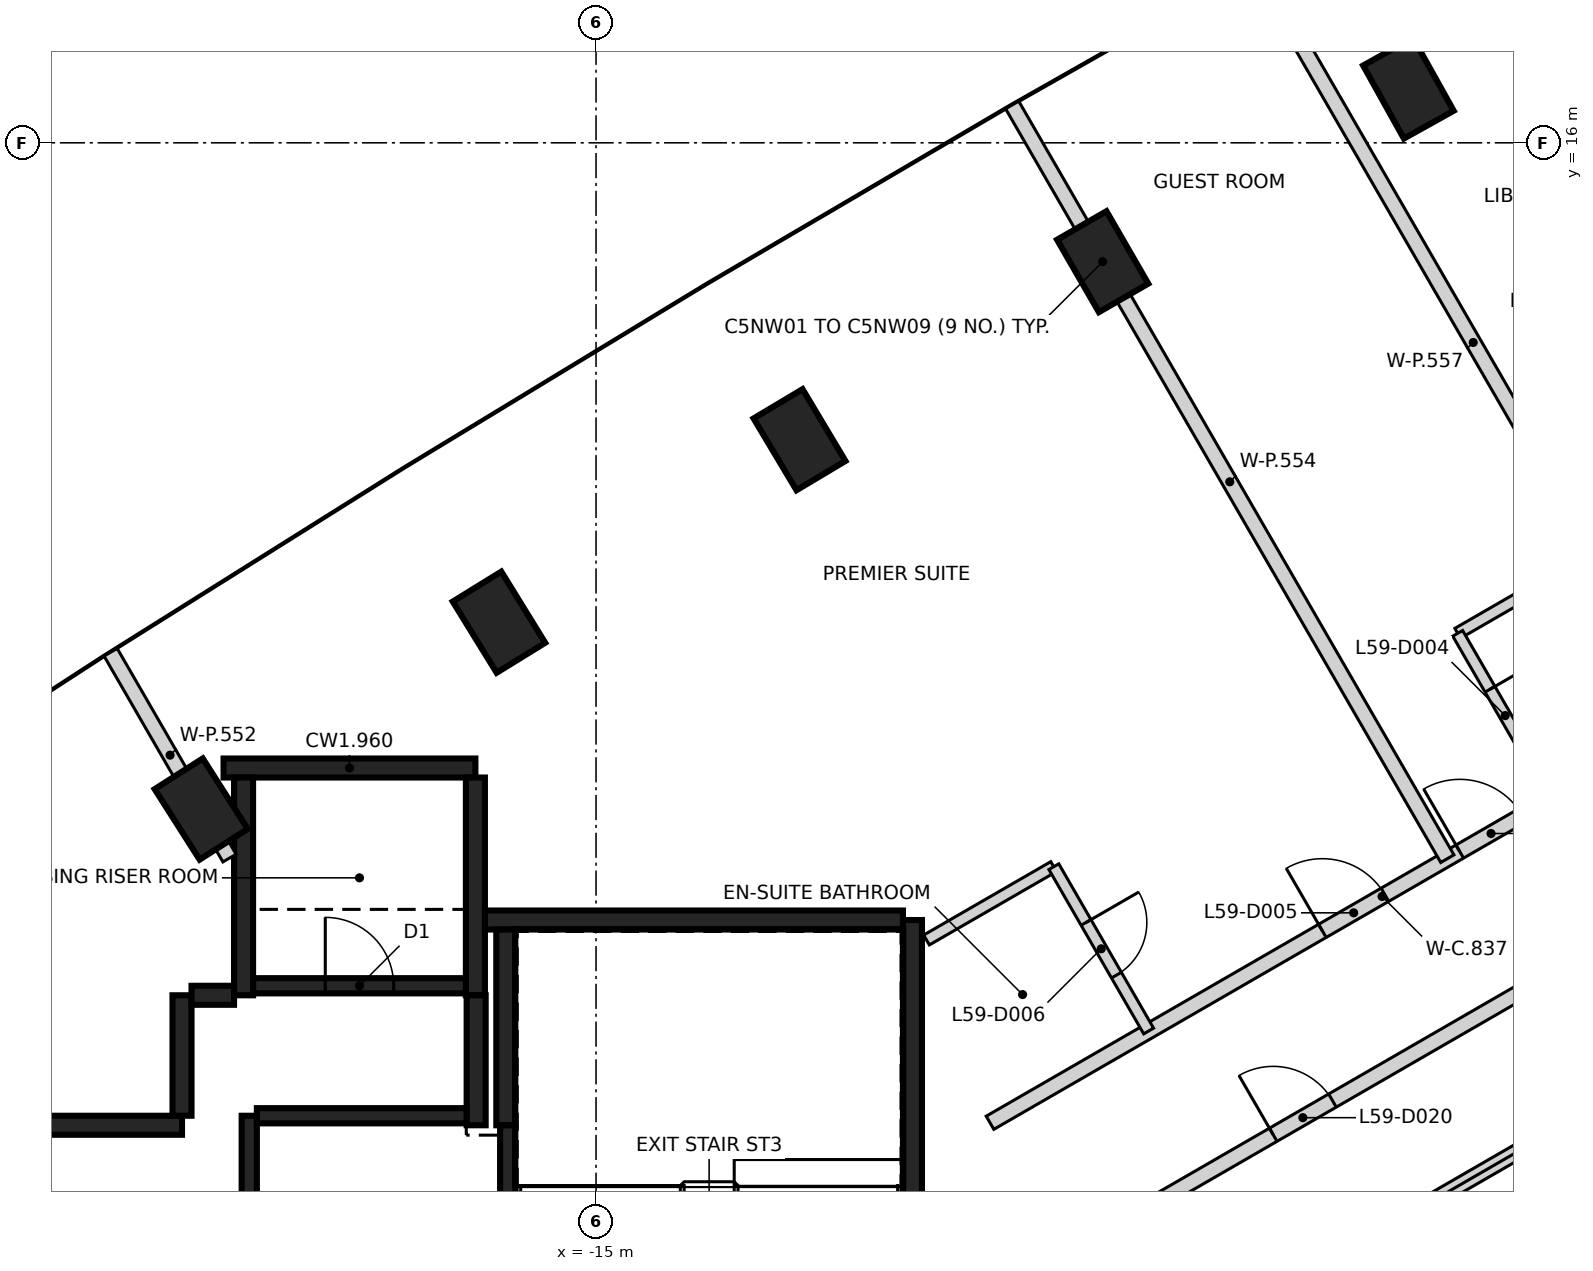
"""IFC4 building model, lengths in metres.
Left out: names, types, materials, properties, quantities, classifications, styles, units other than length and angle.
Written with IfcOpenShell. Run it as: python <this file> out.ifc"""

import sys

from ifc_helpers import new_model, si_unit, direction, frame, frame_2d, origin, origin_2d, place, context, subcontext, project, spatial, rectangle, extrude, element, fill, save


model = new_model("IFC4")
c1 = context("Model", 3, precision=1e-05, world=origin(), true_north=direction((0.0, 1.0)))
c2 = subcontext(c1, "Body", "Model", "MODEL_VIEW")
j1 = project(units=[si_unit("LENGTHUNIT", "METRE"), si_unit("PLANEANGLEUNIT", "RADIAN")], contexts=[c1])
p1 = place(None, origin())
s1 = spatial("IfcSite", under=j1, at=p1, CompositionType="ELEMENT")
p2 = place(p1, origin())
s2 = spatial("IfcBuilding", under=s1, at=p2, CompositionType="ELEMENT")
p3 = place(p2, frame((0.0, 0.0, 235.8)))
s3 = spatial("IfcBuildingStorey", under=s2, at=p3, CompositionType="ELEMENT", Elevation=235.8)
for number, where, z_axis, x_axis in (
    (1, (-4.312, 16.719, -0.35), (0.0, 0.0, 1.0), (-0.487, 0.873, 0.0)),
    (2, (-8.335, 14.436, -0.35), (0.0, 0.0, 1.0), (-0.5, 0.866, 0.0)),
    (3, (-12.323, 12.094, -0.35), (0.0, 0.0, 1.0), (-0.513, 0.858, 0.0)),
    (4, (-16.277, 9.693, -0.35), (0.0, 0.0, 1.0), (-0.525, 0.851, 0.0)),
    (5, (-20.195, 7.235, -0.35), (0.0, 0.0, 1.0), (-0.538, 0.843, 0.0)),
):
    element("IfcColumn", number, at=place(p3, frame(where, z_axis=z_axis, x_axis=x_axis)), inside=s3, PredefinedType="COLUMN", context=c2, shape_type="SweptSolid", body=[
        extrude(rectangle(XDim=1.1, YDim=0.75, at=origin_2d()), origin(), (0.0, 0.0, 1.0), 3.6),
    ])
p4 = place(p3, frame((-10.837, 5.775, 0.0), z_axis=(0.0, 0.0, 1.0), x_axis=(0.0, -1.0, 0.0)))
e6 = element("IfcWall", 6, at=p4, inside=s3, PredefinedType="SHEAR", context=c2, shape_type="SweptSolid", body=[
    extrude(rectangle(XDim=11.55, YDim=0.25, at=frame_2d((5.775, 0.0))), origin(), (0.0, 0.0, 1.0), 3.25),
])
p5 = place(p4, frame((10.025, 0.0, 0.0)))
e7 = element("IfcOpeningElement", 7, at=p5, cuts=e6, PredefinedType="OPENING", context=c2, shape_type="SweptSolid", body=[
    extrude(rectangle(XDim=1.2, YDim=2.1, at=frame_2d((0.6, 1.05))), frame((0.0, 0.135, 0.0), z_axis=(0.0, -1.0, 0.0), x_axis=(1.0, 0.0, 0.0)), (0.0, 0.0, 1.0), 0.27),
])
p6 = place(p4, frame((8.725, 0.0, 0.0)))
e8 = element("IfcOpeningElement", 8, at=p6, cuts=e6, PredefinedType="OPENING", context=c2, shape_type="SweptSolid", body=[
    extrude(rectangle(XDim=1.2, YDim=2.1, at=frame_2d((0.6, 1.05))), frame((0.0, 0.135, 0.0), z_axis=(0.0, -1.0, 0.0), x_axis=(1.0, 0.0, 0.0)), (0.0, 0.0, 1.0), 0.27),
])
p7 = place(p3, frame((-16.472, 5.775, 0.0), z_axis=(0.0, 0.0, 1.0), x_axis=(1.0, 0.0, 0.0)))
e9 = element("IfcWall", 9, at=p7, inside=s3, PredefinedType="SHEAR", context=c2, shape_type="SweptSolid", body=[
    extrude(rectangle(XDim=5.51, YDim=0.25, at=frame_2d((2.755, 0.0))), origin(), (0.0, 0.0, 1.0), 3.25),
])
p8 = place(p3, frame((-19.9, 7.775, 0.0), z_axis=(0.0, 0.0, 1.0), x_axis=(1.0, 0.0, 0.0)))
e10 = element("IfcWall", 10, at=p8, inside=s3, PredefinedType="SHEAR", context=c2, shape_type="SweptSolid", body=[
    extrude(rectangle(XDim=3.313, YDim=0.25, at=frame_2d((1.656, 0.0))), origin(), (0.0, 0.0, 1.0), 3.25),
])
for number, where, z_axis, x_axis in (
    (11, (-16.587, 7.65, 0.0), (0.0, 0.0, 1.0), (0.0, -1.0, 0.0)),
    (12, (-19.637, 4.785, 0.0), (0.0, 0.0, 1.0), (0.0, 1.0, 0.0)),
):
    element("IfcWall", number, at=place(p3, frame(where, z_axis=z_axis, x_axis=x_axis)), inside=s3, PredefinedType="SHEAR", context=c2, shape_type="SweptSolid", body=[
        extrude(rectangle(XDim=2.865, YDim=0.25, at=frame_2d((1.432, 0.0))), origin(), (0.0, 0.0, 1.0), 3.25),
    ])
p9 = place(p3, frame((-16.187, 3.075, 0.0), z_axis=(0.0, 0.0, 1.0), x_axis=(0.0, 1.0, 0.0)))
e13 = element("IfcWall", 13, at=p9, inside=s3, PredefinedType="SHEAR", context=c2, shape_type="SweptSolid", body=[
    extrude(rectangle(XDim=2.575, YDim=0.25, at=frame_2d((1.287, 0.0))), origin(), (0.0, 0.0, 1.0), 3.25),
])
p10 = place(p3, frame((-22.312, 3.075, 0.0), z_axis=(0.0, 0.0, 1.0), x_axis=(1.0, 0.0, 0.0)))
e14 = element("IfcWall", 14, at=p10, inside=s3, PredefinedType="SHEAR", context=c2, shape_type="SweptSolid", body=[
    extrude(rectangle(XDim=1.865, YDim=0.25, at=frame_2d((0.932, 0.0))), origin(), (0.0, 0.0, 1.0), 3.25),
])
p11 = place(p3, frame((-16.577, 4.785, 0.0), z_axis=(0.0, 0.0, 1.0), x_axis=(0.0, -1.0, 0.0)))
e15 = element("IfcWall", 15, at=p11, inside=s3, PredefinedType="SHEAR", context=c2, shape_type="SweptSolid", body=[
    extrude(rectangle(XDim=1.71, YDim=0.25, at=frame_2d((0.855, 0.0))), origin(), (0.0, 0.0, 1.0), 3.25),
])
p12 = place(p3, frame((-20.447, 3.2, 0.0), z_axis=(0.0, 0.0, 1.0), x_axis=(0.0, 1.0, 0.0)))
e16 = element("IfcWall", 16, at=p12, inside=s3, PredefinedType="SHEAR", context=c2, shape_type="SweptSolid", body=[
    extrude(rectangle(XDim=1.584, YDim=0.25, at=frame_2d((0.792, 0.0))), origin(), (0.0, 0.0, 1.0), 3.25),
])
p13 = place(p3, frame((-20.322, 4.785, 0.0), z_axis=(0.0, 0.0, 1.0), x_axis=(1.0, 0.0, 0.0)))
e17 = element("IfcWall", 17, at=p13, inside=s3, PredefinedType="SHEAR", context=c2, shape_type="SweptSolid", body=[
    extrude(rectangle(XDim=0.559, YDim=0.25, at=frame_2d((0.28, 0.0))), origin(), (0.0, 0.0, 1.0), 3.25),
])
p14 = place(p3, frame((-16.162, 3.074, 0.0), z_axis=(0.0, 0.0, 1.0), x_axis=(0.0, -1.0, 0.0)))
e18 = element("IfcWall", 18, at=p14, inside=s3, PredefinedType="SHEAR", context=c2, shape_type="SweptSolid", body=[
    extrude(rectangle(XDim=5.974, YDim=0.2, at=frame_2d((2.987, 0.0))), origin(), (0.0, 0.0, 1.0), 3.25),
])
p15 = place(p3, frame((-19.562, -2.9, 0.0), z_axis=(0.0, 0.0, 1.0), x_axis=(0.0, 1.0, 0.0)))
e19 = element("IfcWall", 19, at=p15, inside=s3, PredefinedType="SHEAR", context=c2, shape_type="SweptSolid", body=[
    extrude(rectangle(XDim=6.1, YDim=0.2, at=frame_2d((3.05, 0.0))), origin(), (0.0, 0.0, 1.0), 3.25),
])
p16 = place(p3, frame((-19.511, 4.91, 0.0), z_axis=(0.0, 0.0, 1.0), x_axis=(1.0, 0.0, 0.0)))
e20 = element("IfcWall", 20, at=p16, inside=s3, PredefinedType="SHEAR", context=c2, shape_type="SweptSolid", body=[
    extrude(rectangle(XDim=2.798, YDim=0.2, at=frame_2d((1.399, 0.0))), origin(), (0.0, 0.0, 1.0), 3.25),
])
p17 = place(p16, frame((0.949, 0.0, 0.0)))
e21 = element("IfcOpeningElement", 21, at=p17, cuts=e20, PredefinedType="OPENING", context=c2, shape_type="SweptSolid", body=[
    extrude(rectangle(XDim=0.9, YDim=2.1, at=frame_2d((0.45, 1.05))), frame((0.0, 0.11, 0.0), z_axis=(0.0, -1.0, 0.0), x_axis=(1.0, 0.0, 0.0)), (0.0, 0.0, 1.0), 0.22),
])
p18 = place(p3, frame((-19.462, 3.2, 0.0), z_axis=(0.0, 0.0, 1.0), x_axis=(1.0, 0.0, 0.0)))
e22 = element("IfcWall", 22, at=p18, inside=s3, PredefinedType="SHEAR", context=c2, shape_type="SweptSolid", body=[
    extrude(rectangle(XDim=2.759, YDim=0.2, at=frame_2d((1.379, 0.0))), origin(), (0.0, 0.0, 1.0), 3.25),
])
p19 = place(p3, frame((-9.817, 3.108, 0.0), z_axis=(0.0, 0.0, 1.0), x_axis=(0.86603471326, 0.499983875168, 0.0)))
e23 = element("IfcWall", 23, at=p19, inside=s3, PredefinedType="PARTITIONING", context=c2, shape_type="SweptSolid", body=[
    extrude(rectangle(XDim=11.911, YDim=0.2, at=frame_2d((5.955, 0.0))), origin(), (0.0, 0.0, 1.0), 3.25),
])
p20 = place(p19, frame((7.136, 0.0, 0.0)))
e24 = element("IfcOpeningElement", 24, at=p20, cuts=e23, PredefinedType="OPENING", context=c2, shape_type="SweptSolid", body=[
    extrude(rectangle(XDim=0.95, YDim=2.1, at=frame_2d((0.475, 1.05))), frame((0.0, 0.11, 0.0), z_axis=(0.0, -1.0, 0.0), x_axis=(1.0, 0.0, 0.0)), (0.0, 0.0, 1.0), 0.22),
])
p21 = place(p19, frame((5.049, 0.0, 0.0)))
e25 = element("IfcOpeningElement", 25, at=p21, cuts=e23, PredefinedType="OPENING", context=c2, shape_type="SweptSolid", body=[
    extrude(rectangle(XDim=0.95, YDim=2.1, at=frame_2d((0.475, 1.05))), frame((0.0, 0.11, 0.0), z_axis=(0.0, -1.0, 0.0), x_axis=(1.0, 0.0, 0.0)), (0.0, 0.0, 1.0), 0.22),
])
p22 = place(p3, frame((-8.612, 1.494, 0.0), z_axis=(0.0, 0.0, 1.0), x_axis=(0.8660441356, 0.49996755414, 0.0)))
e26 = element("IfcWall", 26, at=p22, inside=s3, PredefinedType="PARTITIONING", context=c2, shape_type="SweptSolid", body=[
    extrude(rectangle(XDim=13.422, YDim=0.2, at=frame_2d((6.711, 0.0))), origin(), (0.0, 0.0, 1.0), 3.25),
])
p23 = place(p22, frame((9.611, 0.0, 0.0)))
e27 = element("IfcOpeningElement", 27, at=p23, cuts=e26, PredefinedType="OPENING", context=c2, shape_type="SweptSolid", body=[
    extrude(rectangle(XDim=0.9, YDim=2.1, at=frame_2d((0.45, 1.05))), frame((0.0, 0.11, 0.0), z_axis=(0.0, -1.0, 0.0), x_axis=(1.0, 0.0, 0.0)), (0.0, 0.0, 1.0), 0.22),
])
p24 = place(p22, frame((2.911, 0.0, 0.0)))
e28 = element("IfcOpeningElement", 28, at=p24, cuts=e26, PredefinedType="OPENING", context=c2, shape_type="SweptSolid", body=[
    extrude(rectangle(XDim=0.9, YDim=2.1, at=frame_2d((0.45, 1.05))), frame((0.0, 0.11, 0.0), z_axis=(0.0, -1.0, 0.0), x_axis=(1.0, 0.0, 0.0)), (0.0, 0.0, 1.0), 0.22),
])
p25 = place(p3, frame((-21.386, 9.298, 0.0), z_axis=(0.0, 0.0, 1.0), x_axis=(0.500017489778, -0.866015305821, 0.0)))
e29 = element("IfcWall", 29, at=p25, inside=s3, PredefinedType="PARTITIONING", context=c2, shape_type="SweptSolid", body=[
    extrude(rectangle(XDim=3.128, YDim=0.2, at=frame_2d((1.564, 0.0))), origin(), (0.0, 0.0, 1.0), 3.25),
])
p26 = place(p3, frame((-9.525, 16.498, 0.0), z_axis=(0.0, 0.0, 1.0), x_axis=(0.500030684965, -0.866007687087, 0.0)))
e30 = element("IfcWall", 30, at=p26, inside=s3, PredefinedType="PARTITIONING", context=c2, shape_type="SweptSolid", body=[
    extrude(rectangle(XDim=11.45, YDim=0.2, at=frame_2d((5.725, 0.0))), origin(), (0.0, 0.0, 1.0), 3.25),
])
p27 = place(p3, frame((-6.315, 18.32, 0.0), z_axis=(0.0, 0.0, 1.0), x_axis=(0.500012296027, -0.866018304553, 0.0)))
e31 = element("IfcWall", 31, at=p27, inside=s3, PredefinedType="PARTITIONING", context=c2, shape_type="SweptSolid", body=[
    extrude(rectangle(XDim=11.423, YDim=0.2, at=frame_2d((5.711, 0.0))), origin(), (0.0, 0.0, 1.0), 2.35),
])
p28 = place(p3, frame((-6.0, 0.924, 0.0), z_axis=(0.0, 0.0, 1.0), x_axis=(0.866012967051, 0.500021540435, 0.0)))
e32 = element("IfcWall", 32, at=p28, inside=s3, PredefinedType="PARTITIONING", context=c2, shape_type="SweptSolid", body=[
    extrude(rectangle(XDim=9.468, YDim=0.2, at=frame_2d((4.734, 0.0))), origin(), (0.0, 0.0, 1.0), 3.25),
])
p29 = place(p3, frame((-10.652, 5.512, 0.0), z_axis=(0.0, 0.0, 1.0), x_axis=(0.866017156151, 0.500014285048, 0.0)))
e33 = element("IfcWall", 33, at=p29, inside=s3, PredefinedType="PARTITIONING", context=c2, shape_type="SweptSolid", body=[
    extrude(rectangle(XDim=1.931, YDim=0.15, at=frame_2d((0.966, 0.0))), origin(), (0.0, 0.0, 1.0), 3.25),
])
p30 = place(p3, frame((-8.977, 6.477, 0.0), z_axis=(0.0, 0.0, 1.0), x_axis=(0.499632127845, -0.86623769072, 0.0)))
e34 = element("IfcWall", 34, at=p30, inside=s3, PredefinedType="PARTITIONING", context=c2, shape_type="SweptSolid", body=[
    extrude(rectangle(XDim=2.496, YDim=0.15, at=frame_2d((1.248, 0.0))), origin(), (0.0, 0.0, 1.0), 3.25),
])
p31 = place(p30, frame((0.847, 0.0, 0.0)))
e35 = element("IfcOpeningElement", 35, at=p31, cuts=e34, PredefinedType="OPENING", context=c2, shape_type="SweptSolid", body=[
    extrude(rectangle(XDim=0.8, YDim=2.1, at=frame_2d((0.4, 1.05))), frame((0.0, 0.085, 0.0), z_axis=(0.0, -1.0, 0.0), x_axis=(1.0, 0.0, 0.0)), (0.0, 0.0, 1.0), 0.17),
])
p32 = place(p3, frame((-3.664, 9.547, 0.0), z_axis=(0.0, 0.0, 1.0), x_axis=(0.866049423672, 0.499958394027, 0.0)))
e36 = element("IfcWall", 36, at=p32, inside=s3, PredefinedType="PARTITIONING", context=c2, shape_type="SweptSolid", body=[
    extrude(rectangle(XDim=2.09, YDim=0.15, at=frame_2d((1.045, 0.0))), origin(), (0.0, 0.0, 1.0), 3.25),
])
p33 = place(p3, frame((-3.664, 9.547, 0.0), z_axis=(0.0, 0.0, 1.0), x_axis=(0.500004234368, -0.866022959057, 0.0)))
e37 = element("IfcWall", 37, at=p33, inside=s3, PredefinedType="PARTITIONING", context=c2, shape_type="SweptSolid", body=[
    extrude(rectangle(XDim=2.5, YDim=0.15, at=frame_2d((1.25, 0.0))), origin(), (0.0, 0.0, 1.0), 3.25),
])
p34 = place(p33, frame((0.85, 0.0, 0.0)))
e38 = element("IfcOpeningElement", 38, at=p34, cuts=e37, PredefinedType="OPENING", context=c2, shape_type="SweptSolid", body=[
    extrude(rectangle(XDim=0.8, YDim=2.1, at=frame_2d((0.4, 1.05))), frame((0.0, 0.085, 0.0), z_axis=(0.0, -1.0, 0.0), x_axis=(1.0, 0.0, 0.0)), (0.0, 0.0, 1.0), 0.17),
])
p35 = place(p17, origin())
e39 = element("IfcDoor", 39, at=p35, inside=s3, OperationType="SINGLE_SWING_RIGHT", PredefinedType="DOOR", context=c2, shape_type="SweptSolid", body=[
    extrude(rectangle(XDim=0.9, YDim=2.1, at=frame_2d((0.45, 1.05))), frame((0.0, 0.025, 0.0), z_axis=(0.0, -1.0, 0.0), x_axis=(1.0, 0.0, 0.0)), (0.0, 0.0, 1.0), 0.05),
])
fill(e21, e39)
p36 = place(p20, origin())
e40 = element("IfcDoor", 40, at=p36, inside=s3, OperationType="SINGLE_SWING_LEFT", PredefinedType="DOOR", context=c2, shape_type="SweptSolid", body=[
    extrude(rectangle(XDim=0.95, YDim=2.1, at=frame_2d((0.475, 1.05))), frame((0.0, 0.025, 0.0), z_axis=(0.0, -1.0, 0.0), x_axis=(1.0, 0.0, 0.0)), (0.0, 0.0, 1.0), 0.05),
])
fill(e24, e40)
p37 = place(p34, origin())
e41 = element("IfcDoor", 41, at=p37, inside=s3, OperationType="SINGLE_SWING_LEFT", PredefinedType="DOOR", context=c2, shape_type="SweptSolid", body=[
    extrude(rectangle(XDim=0.8, YDim=2.1, at=frame_2d((0.4, 1.05))), frame((0.0, 0.025, 0.0), z_axis=(0.0, -1.0, 0.0), x_axis=(1.0, 0.0, 0.0)), (0.0, 0.0, 1.0), 0.05),
])
fill(e38, e41)
p38 = place(p21, origin())
e42 = element("IfcDoor", 42, at=p38, inside=s3, OperationType="SINGLE_SWING_LEFT", PredefinedType="DOOR", context=c2, shape_type="SweptSolid", body=[
    extrude(rectangle(XDim=0.95, YDim=2.1, at=frame_2d((0.475, 1.05))), frame((0.0, 0.025, 0.0), z_axis=(0.0, -1.0, 0.0), x_axis=(1.0, 0.0, 0.0)), (0.0, 0.0, 1.0), 0.05),
])
fill(e25, e42)
p39 = place(p31, frame((0.8, 0.0, 0.0), z_axis=(0.0, 0.0, 1.0), x_axis=(-1.0, 0.0, 0.0)))
e43 = element("IfcDoor", 43, at=p39, inside=s3, OperationType="SINGLE_SWING_LEFT", PredefinedType="DOOR", context=c2, shape_type="SweptSolid", body=[
    extrude(rectangle(XDim=0.8, YDim=2.1, at=frame_2d((0.4, 1.05))), frame((0.0, 0.025, 0.0), z_axis=(0.0, -1.0, 0.0), x_axis=(1.0, 0.0, 0.0)), (0.0, 0.0, 1.0), 0.05),
])
fill(e35, e43)
p40 = place(p24, frame((0.9, 0.0, 0.0), z_axis=(0.0, 0.0, 1.0), x_axis=(-1.0, 0.0, 0.0)))
e44 = element("IfcDoor", 44, at=p40, inside=s3, OperationType="SINGLE_SWING_LEFT", PredefinedType="DOOR", context=c2, shape_type="SweptSolid", body=[
    extrude(rectangle(XDim=0.9, YDim=2.1, at=frame_2d((0.45, 1.05))), frame((0.0, 0.025, 0.0), z_axis=(0.0, -1.0, 0.0), x_axis=(1.0, 0.0, 0.0)), (0.0, 0.0, 1.0), 0.05),
])
fill(e28, e44)
save(model, sys.argv[1])
